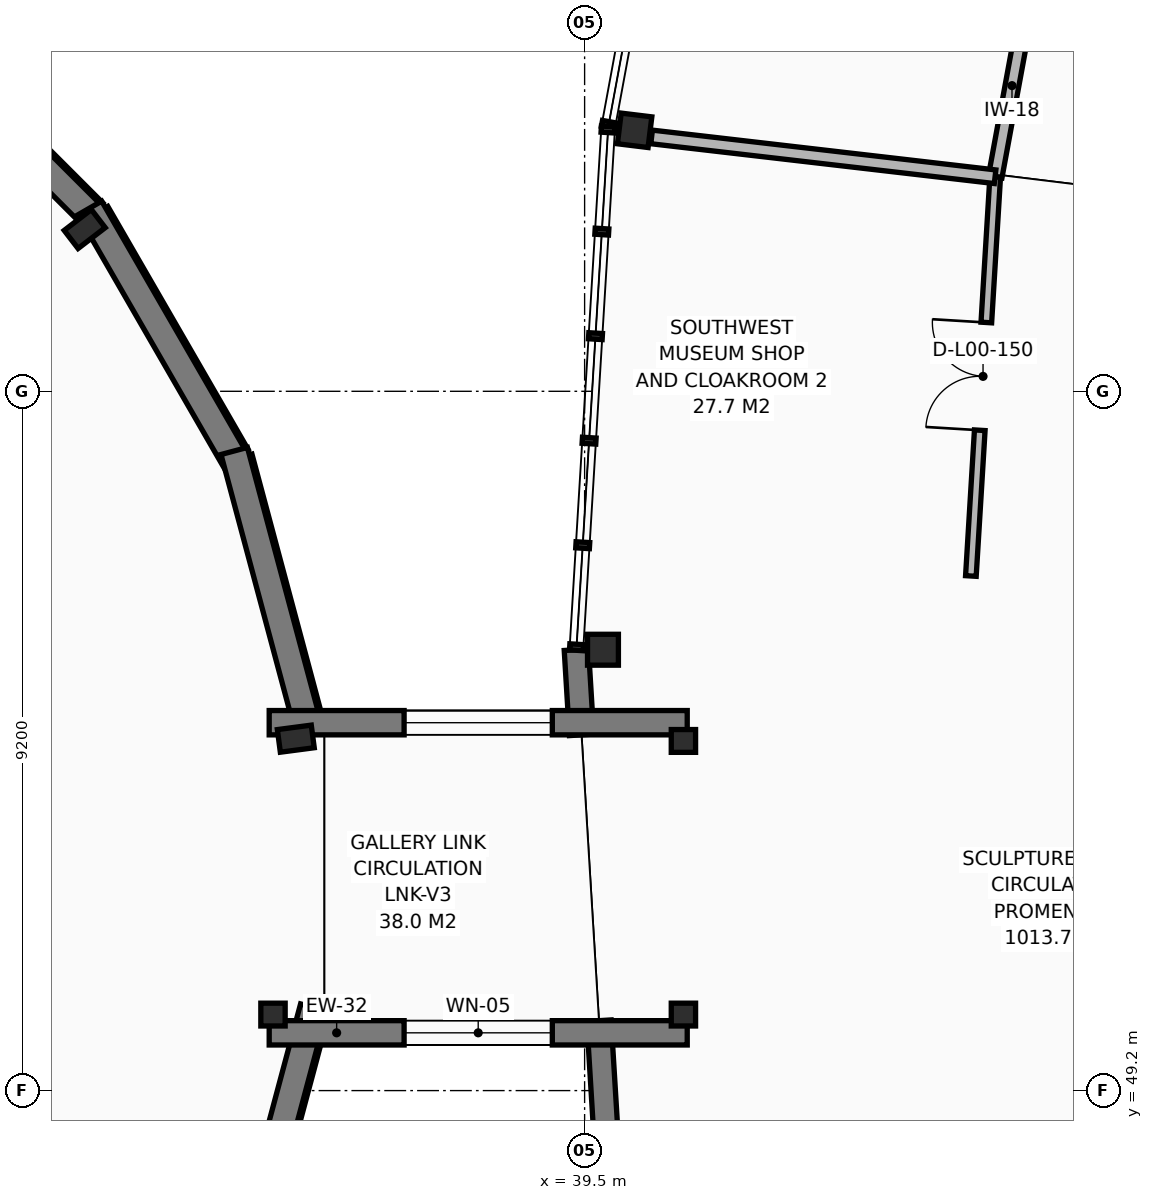
"""IFC4 building model, lengths in metres.
Left out: names, types, materials, properties, quantities, classifications, styles, units other than length and angle.
Written with IfcOpenShell. Run it as: python <this file> out.ifc"""

import sys

from ifc_helpers import new_model, si_unit, direction, frame, frame_2d, origin, origin_2d, place, context, subcontext, project, spatial, rectangle, hollow_circle, i_section, extrude, element, fill, save


model = new_model("IFC4")
c1 = context("Model", 3, precision=1e-05, world=origin(), true_north=direction((0.0, 1.0)))
c2 = subcontext(c1, "Body", "Model", "MODEL_VIEW")
j1 = project(units=[si_unit("LENGTHUNIT", "METRE"), si_unit("PLANEANGLEUNIT", "RADIAN")], contexts=[c1])
p1 = place(None, origin())
s1 = spatial("IfcSite", under=j1, at=p1, CompositionType="ELEMENT")
p2 = place(p1, origin())
s2 = spatial("IfcBuilding", under=s1, at=p2, CompositionType="ELEMENT")
p3 = place(p2, origin())
s3 = spatial("IfcBuildingStorey", under=s2, at=p3, CompositionType="ELEMENT", Elevation=0.0)
for number, where, z_axis, x_axis in (
    (1, (40.158, 61.833, 0.0), (0.0, 0.0, 1.0), (0.993, -0.122, 0.0)),
    (2, (39.741, 55.0, 0.0), (0.0, 0.0, 1.0), (1.0, 0.0, 0.0)),
):
    element("IfcColumn", number, at=place(p3, frame(where, z_axis=z_axis, x_axis=x_axis)), inside=s3, PredefinedType="COLUMN", context=c2, shape_type="SweptSolid", body=[
        extrude(hollow_circle(Radius=0.203, WallThickness=0.02, at=origin_2d()), origin(), (0.0, 0.0, 1.0), 5.1),
    ])
for number, where, z_axis, x_axis in (
    (3, (35.7, 53.83, 0.0), (0.0, 0.0, 1.0), (0.991, 0.131, 0.0)),
    (4, (32.923, 60.535, 0.0), (0.0, 0.0, 1.0), (0.793, 0.609, 0.0)),
):
    element("IfcColumn", number, at=place(p3, frame(where, z_axis=z_axis, x_axis=x_axis)), inside=s3, PredefinedType="COLUMN", context=c2, shape_type="SweptSolid", body=[
        extrude(i_section(OverallWidth=0.3, OverallDepth=0.45, WebThickness=0.014, FlangeThickness=0.026, FilletRadius=0.027, at=origin_2d()), origin(), (0.0, 0.0, 1.0), 5.1),
    ])
for number, where, z_axis, x_axis in (
    (5, (35.4, 50.2, 0.0), (0.0, 0.0, 1.0), (1.0, 0.0, 0.0)),
    (6, (40.8, 50.2, 0.0), (0.0, 0.0, 1.0), (1.0, 0.0, 0.0)),
    (7, (40.8, 53.8, 0.0), (0.0, 0.0, 1.0), (1.0, 0.0, 0.0)),
):
    element("IfcColumn", number, at=place(p3, frame(where, z_axis=z_axis, x_axis=x_axis)), inside=s3, PredefinedType="COLUMN", context=c2, shape_type="SweptSolid", body=[
        extrude(i_section(OverallWidth=0.3, OverallDepth=0.32, WebThickness=0.011, FlangeThickness=0.021, FilletRadius=0.027, at=origin_2d()), origin(), (0.0, 0.0, 1.0), 5.1),
    ])
p4 = place(p3, frame((39.46, 53.88, 0.0), z_axis=(0.0, 0.0, 1.0), x_axis=(-0.060698683883, 0.998156134968, 0.0)))
e8 = element("IfcWall", 8, at=p4, inside=s3, PredefinedType="SOLIDWALL", context=c2, shape_type="SweptSolid", body=[
    extrude(rectangle(XDim=1.122, YDim=0.32, at=frame_2d((0.561, 0.0))), origin(), (0.0, 0.0, 1.0), 4.88),
])
p5 = place(p3, frame((39.811, 48.124, 0.0), z_axis=(0.0, 0.0, 1.0), x_axis=(-0.060797305058, 0.998150132845, 0.0)))
e9 = element("IfcWall", 9, at=p5, inside=s3, PredefinedType="SOLIDWALL", context=c2, shape_type="SweptSolid", body=[
    extrude(rectangle(XDim=2.0, YDim=0.32, at=frame_2d((1.0, 0.0))), origin(), (0.0, 0.0, 1.0), 4.88),
])
p6 = place(p3, frame((35.937, 50.294, 0.0), z_axis=(0.0, 0.0, 1.0), x_axis=(-0.258798150836, -0.965931424649, 0.0)))
e10 = element("IfcWall", 10, at=p6, inside=s3, PredefinedType="SOLIDWALL", context=c2, shape_type="SweptSolid", body=[
    extrude(rectangle(XDim=3.867, YDim=0.36, at=frame_2d((1.934, 0.0))), origin(), (0.0, 0.0, 1.0), 4.82),
])
for number, where, z_axis, x_axis in (
    (11, (30.328, 63.408, 0.0), (0.0, 0.0, 1.0), (0.707, -0.707, 0.0)),
    (12, (32.99, 60.812, 0.0), (0.0, 0.0, 1.0), (0.5, -0.866, 0.0)),
):
    element("IfcWall", number, at=place(p3, frame(where, z_axis=z_axis, x_axis=x_axis)), inside=s3, PredefinedType="SOLIDWALL", context=c2, shape_type="SweptSolid", body=[
        extrude(rectangle(XDim=3.892, YDim=0.36, at=frame_2d((1.946, 0.0))), origin(), (0.0, 0.0, 1.0), 4.82),
    ])
p7 = place(p3, frame((34.89, 57.615, 0.0), z_axis=(0.0, 0.0, 1.0), x_axis=(0.258798150836, -0.965931424649, 0.0)))
e13 = element("IfcWall", 13, at=p7, inside=s3, PredefinedType="SOLIDWALL", context=c2, shape_type="SweptSolid", body=[
    extrude(rectangle(XDim=3.867, YDim=0.36, at=frame_2d((1.934, 0.0))), origin(), (0.0, 0.0, 1.0), 4.82),
])
p8 = place(p3, frame((40.85, 49.96, 0.0), z_axis=(0.0, 0.0, 1.0), x_axis=(-1.0, 0.0, 0.0)))
e14 = element("IfcWall", 14, at=p8, inside=s3, PredefinedType="SOLIDWALL", context=c2, shape_type="SweptSolid", body=[
    extrude(rectangle(XDim=5.5, YDim=0.32, at=frame_2d((2.75, 0.0))), origin(), (0.0, 0.0, 1.0), 4.82),
])
p9 = place(p8, frame((1.775, 0.0, 1.12)))
e15 = element("IfcOpeningElement", 15, at=p9, cuts=e14, PredefinedType="OPENING", context=c2, shape_type="SweptSolid", body=[
    extrude(rectangle(XDim=1.95, YDim=1.5, at=frame_2d((0.975, 0.75))), frame((0.0, 0.17, 0.0), z_axis=(0.0, -1.0, 0.0), x_axis=(1.0, 0.0, 0.0)), (0.0, 0.0, 1.0), 0.34),
])
p10 = place(p3, frame((35.35, 54.04, 0.0), z_axis=(0.0, 0.0, 1.0), x_axis=(1.0, 0.0, 0.0)))
e16 = element("IfcWall", 16, at=p10, inside=s3, PredefinedType="SOLIDWALL", context=c2, shape_type="SweptSolid", body=[
    extrude(rectangle(XDim=5.5, YDim=0.32, at=frame_2d((2.75, 0.0))), origin(), (0.0, 0.0, 1.0), 4.82),
])
p11 = place(p10, frame((1.775, 0.0, 1.12)))
e17 = element("IfcOpeningElement", 17, at=p11, cuts=e16, PredefinedType="OPENING", context=c2, shape_type="SweptSolid", body=[
    extrude(rectangle(XDim=1.95, YDim=1.5, at=frame_2d((0.975, 0.75))), frame((0.0, 0.17, 0.0), z_axis=(0.0, -1.0, 0.0), x_axis=(1.0, 0.0, 0.0)), (0.0, 0.0, 1.0), 0.34),
])
p12 = place(p3, frame((44.902, 61.223, 0.0), z_axis=(0.0, 0.0, 1.0), x_axis=(0.181126899018, 0.98345973301, 0.0)))
e18 = element("IfcWall", 18, at=p12, inside=s3, PredefinedType="PARTITIONING", context=c2, shape_type="SweptSolid", body=[
    extrude(rectangle(XDim=6.296, YDim=0.18, at=frame_2d((3.148, 0.0))), origin(), (0.0, 0.0, 1.0), 4.37),
])
p13 = place(p12, frame((2.438, 0.0, 0.0)))
e19 = element("IfcOpeningElement", 19, at=p13, cuts=e18, PredefinedType="OPENING", context=c2, shape_type="SweptSolid", body=[
    extrude(rectangle(XDim=1.42, YDim=2.18, at=frame_2d((0.71, 1.09))), frame((0.0, 0.1, 0.0), z_axis=(0.0, -1.0, 0.0), x_axis=(1.0, 0.0, 0.0)), (0.0, 0.0, 1.0), 0.2),
])
p14 = place(p3, frame((44.582, 55.97, 0.0), z_axis=(0.0, 0.0, 1.0), x_axis=(0.060821422168, 0.998148663579, 0.0)))
e20 = element("IfcWall", 20, at=p14, inside=s3, PredefinedType="PARTITIONING", context=c2, shape_type="SweptSolid", body=[
    extrude(rectangle(XDim=5.262, YDim=0.14, at=frame_2d((2.631, 0.0))), origin(), (0.0, 0.0, 1.0), 4.37),
])
p15 = place(p14, frame((1.921, 0.0, 0.0)))
e21 = element("IfcOpeningElement", 21, at=p15, cuts=e20, PredefinedType="OPENING", context=c2, shape_type="SweptSolid", body=[
    extrude(rectangle(XDim=1.42, YDim=2.18, at=frame_2d((0.71, 1.09))), frame((0.0, 0.08, 0.0), z_axis=(0.0, -1.0, 0.0), x_axis=(1.0, 0.0, 0.0)), (0.0, 0.0, 1.0), 0.16),
])
p16 = place(p3, frame((44.901, 61.223, 0.0), z_axis=(0.0, 0.0, 1.0), x_axis=(-0.993352407823, 0.11511296136, 0.0)))
e22 = element("IfcWall", 22, at=p16, inside=s3, PredefinedType="PARTITIONING", context=c2, shape_type="SweptSolid", body=[
    extrude(rectangle(XDim=4.549, YDim=0.18, at=frame_2d((2.275, 0.0))), origin(), (0.0, 0.0, 1.0), 4.37),
])
p17 = place(p9, origin())
e23 = element("IfcWindow", 23, at=p17, inside=s3, PartitioningType="SINGLE_PANEL", PredefinedType="WINDOW", context=c2, shape_type="SweptSolid", body=[
    extrude(rectangle(XDim=1.95, YDim=1.5, at=frame_2d((0.975, 0.75))), frame((0.0, 0.03, 0.0), z_axis=(0.0, -1.0, 0.0), x_axis=(1.0, 0.0, 0.0)), (0.0, 0.0, 1.0), 0.06),
])
fill(e15, e23)
p18 = place(p11, origin())
e24 = element("IfcWindow", 24, at=p18, inside=s3, PartitioningType="SINGLE_PANEL", PredefinedType="WINDOW", context=c2, shape_type="SweptSolid", body=[
    extrude(rectangle(XDim=1.95, YDim=1.5, at=frame_2d((0.975, 0.75))), frame((0.0, 0.03, 0.0), z_axis=(0.0, -1.0, 0.0), x_axis=(1.0, 0.0, 0.0)), (0.0, 0.0, 1.0), 0.06),
])
fill(e17, e24)
p19 = place(p15, origin())
e25 = element("IfcDoor", 25, at=p19, inside=s3, OperationType="DOUBLE_DOOR_SINGLE_SWING", PredefinedType="DOOR", context=c2, shape_type="SweptSolid", body=[
    extrude(rectangle(XDim=1.42, YDim=2.18, at=frame_2d((0.71, 1.09))), frame((0.0, 0.025, 0.0), z_axis=(0.0, -1.0, 0.0), x_axis=(1.0, 0.0, 0.0)), (0.0, 0.0, 1.0), 0.05),
])
fill(e21, e25)
save(model, sys.argv[1])
